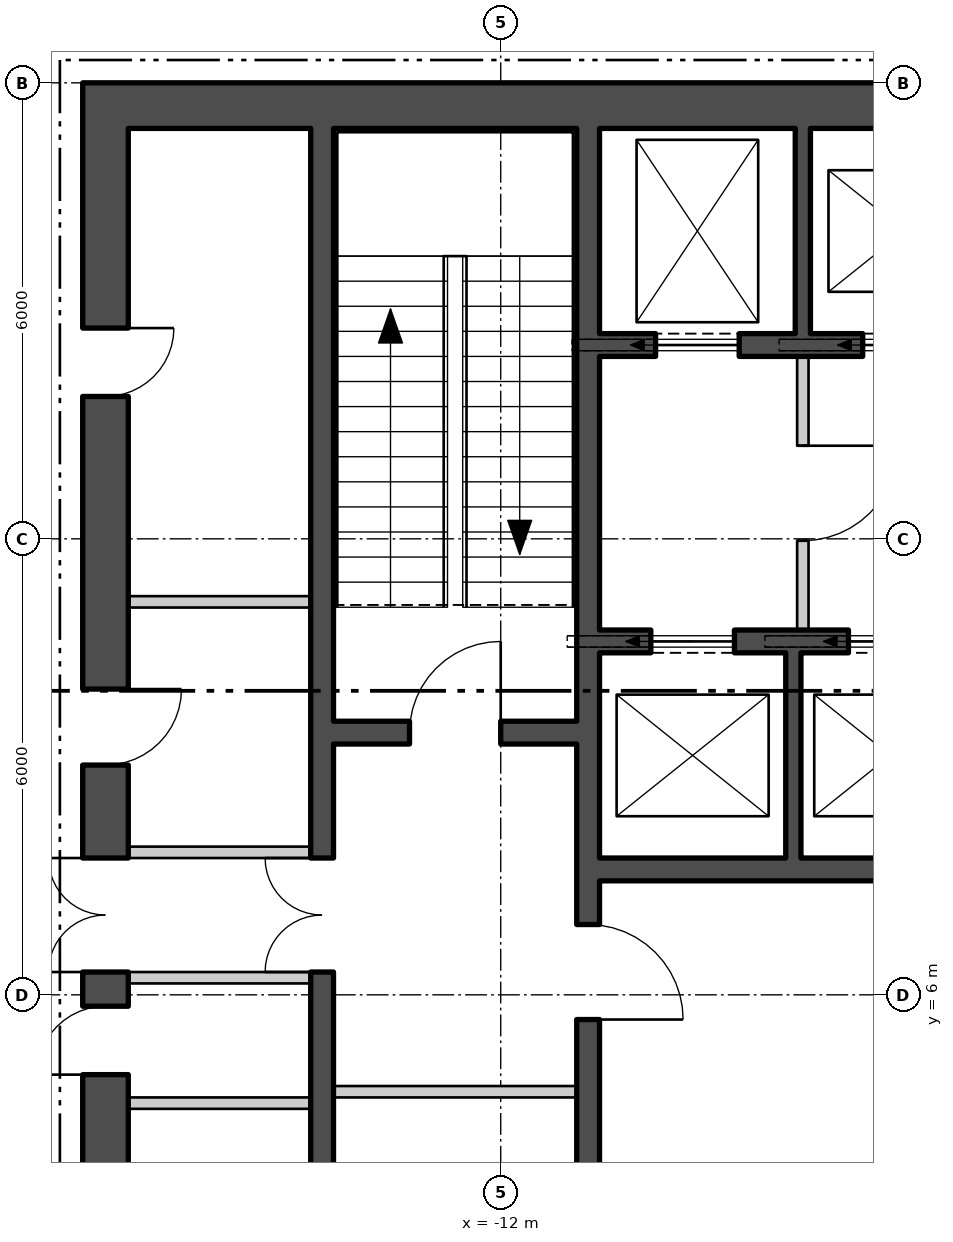
"""IFC4 building model, lengths in metres.
Left out: names, types, materials, properties, quantities, classifications, styles, units other than length and angle.
Written with IfcOpenShell. Run it as: python <this file> out.ifc"""

import sys

from ifc_helpers import new_model, si_unit, direction, frame, frame_2d, origin, place, context, subcontext, project, spatial, polyline, rectangle, outline, extrude, element, fill, save


model = new_model("IFC4")
c1 = context("Model", 3, precision=1e-05, world=origin(), true_north=direction((0.0, 1.0)))
c2 = subcontext(c1, "Body", "Model", "MODEL_VIEW")
j1 = project(units=[si_unit("LENGTHUNIT", "METRE"), si_unit("PLANEANGLEUNIT", "RADIAN")], contexts=[c1])
p1 = place(None, origin())
s1 = spatial("IfcSite", under=j1, at=p1, CompositionType="ELEMENT")
p2 = place(p1, origin())
s2 = spatial("IfcBuilding", under=s1, at=p2, CompositionType="ELEMENT")
p3 = place(p2, frame((0.0, 0.0, 69.3)))
s3 = spatial("IfcBuildingStorey", under=s2, at=p3, CompositionType="ELEMENT", Elevation=69.3)
p4 = place(p3, frame((-28.18, 10.778, -0.18), z_axis=(0.0, 0.0, 1.0), x_axis=(0.500000711659, -0.866024992908, 0.0)))
e1 = element("IfcWall", 1, at=p4, inside=s3, PredefinedType="SOLIDWALL", context=c2, shape_type="SweptSolid", body=[
    extrude(outline(polyline([(-0.13, -0.225), (45.87, -0.225), (45.61, 0.225), (0.13, 0.225), (-0.13, -0.225)])), origin(), (0.0, 0.0, 1.0), 4.28),
])
p5 = place(p4, frame((1.424, 0.0, 1.08)))
e2 = element("IfcOpeningElement", 2, at=p5, cuts=e1, PredefinedType="OPENING", context=c2, shape_type="SweptSolid", body=[
    extrude(rectangle(XDim=2.4, YDim=2.6, at=frame_2d((1.2, 1.3))), frame((0.0, 0.235, 0.0), z_axis=(0.0, -1.0, 0.0), x_axis=(1.0, 0.0, 0.0)), (0.0, 0.0, 1.0), 0.47),
])
p6 = place(p4, frame((5.893, 0.0, 1.08)))
e3 = element("IfcOpeningElement", 3, at=p6, cuts=e1, PredefinedType="OPENING", context=c2, shape_type="SweptSolid", body=[
    extrude(rectangle(XDim=2.4, YDim=2.6, at=frame_2d((1.2, 1.3))), frame((0.0, 0.235, 0.0), z_axis=(0.0, -1.0, 0.0), x_axis=(1.0, 0.0, 0.0)), (0.0, 0.0, 1.0), 0.47),
])
p7 = place(p4, frame((10.401, 0.0, 1.08)))
e4 = element("IfcOpeningElement", 4, at=p7, cuts=e1, PredefinedType="OPENING", context=c2, shape_type="SweptSolid", body=[
    extrude(rectangle(XDim=2.4, YDim=2.6, at=frame_2d((1.2, 1.3))), frame((0.0, 0.235, 0.0), z_axis=(0.0, -1.0, 0.0), x_axis=(1.0, 0.0, 0.0)), (0.0, 0.0, 1.0), 0.47),
])
p8 = place(p4, frame((14.909, 0.0, 1.08)))
e5 = element("IfcOpeningElement", 5, at=p8, cuts=e1, PredefinedType="OPENING", context=c2, shape_type="SweptSolid", body=[
    extrude(rectangle(XDim=2.4, YDim=2.6, at=frame_2d((1.2, 1.3))), frame((0.0, 0.235, 0.0), z_axis=(0.0, -1.0, 0.0), x_axis=(1.0, 0.0, 0.0)), (0.0, 0.0, 1.0), 0.47),
])
p9 = place(p4, frame((19.416, 0.0, 1.08)))
e6 = element("IfcOpeningElement", 6, at=p9, cuts=e1, PredefinedType="OPENING", context=c2, shape_type="SweptSolid", body=[
    extrude(rectangle(XDim=2.4, YDim=2.6, at=frame_2d((1.2, 1.3))), frame((0.0, 0.235, 0.0), z_axis=(0.0, -1.0, 0.0), x_axis=(1.0, 0.0, 0.0)), (0.0, 0.0, 1.0), 0.47),
])
p10 = place(p4, frame((23.924, 0.0, 1.08)))
e7 = element("IfcOpeningElement", 7, at=p10, cuts=e1, PredefinedType="OPENING", context=c2, shape_type="SweptSolid", body=[
    extrude(rectangle(XDim=2.4, YDim=2.6, at=frame_2d((1.2, 1.3))), frame((0.0, 0.235, 0.0), z_axis=(0.0, -1.0, 0.0), x_axis=(1.0, 0.0, 0.0)), (0.0, 0.0, 1.0), 0.47),
])
p11 = place(p4, frame((28.431, 0.0, 1.08)))
e8 = element("IfcOpeningElement", 8, at=p11, cuts=e1, PredefinedType="OPENING", context=c2, shape_type="SweptSolid", body=[
    extrude(rectangle(XDim=2.4, YDim=2.6, at=frame_2d((1.2, 1.3))), frame((0.0, 0.235, 0.0), z_axis=(0.0, -1.0, 0.0), x_axis=(1.0, 0.0, 0.0)), (0.0, 0.0, 1.0), 0.47),
])
p12 = place(p4, frame((32.939, 0.0, 1.08)))
e9 = element("IfcOpeningElement", 9, at=p12, cuts=e1, PredefinedType="OPENING", context=c2, shape_type="SweptSolid", body=[
    extrude(rectangle(XDim=2.4, YDim=2.6, at=frame_2d((1.2, 1.3))), frame((0.0, 0.235, 0.0), z_axis=(0.0, -1.0, 0.0), x_axis=(1.0, 0.0, 0.0)), (0.0, 0.0, 1.0), 0.47),
])
p13 = place(p4, frame((37.447, 0.0, 1.08)))
e10 = element("IfcOpeningElement", 10, at=p13, cuts=e1, PredefinedType="OPENING", context=c2, shape_type="SweptSolid", body=[
    extrude(rectangle(XDim=2.4, YDim=2.6, at=frame_2d((1.2, 1.3))), frame((0.0, 0.235, 0.0), z_axis=(0.0, -1.0, 0.0), x_axis=(1.0, 0.0, 0.0)), (0.0, 0.0, 1.0), 0.47),
])
p14 = place(p4, frame((41.916, 0.0, 1.08)))
e11 = element("IfcOpeningElement", 11, at=p14, cuts=e1, PredefinedType="OPENING", context=c2, shape_type="SweptSolid", body=[
    extrude(rectangle(XDim=2.4, YDim=2.6, at=frame_2d((1.2, 1.3))), frame((0.0, 0.235, 0.0), z_axis=(0.0, -1.0, 0.0), x_axis=(1.0, 0.0, 0.0)), (0.0, 0.0, 1.0), 0.47),
])
p15 = place(p3, frame((-17.5, 17.7, 0.0), z_axis=(0.0, 0.0, 1.0), x_axis=(1.0, 0.0, 0.0)))
e12 = element("IfcWall", 12, at=p15, inside=s3, PredefinedType="SHEAR", context=c2, shape_type="SweptSolid", body=[
    extrude(rectangle(XDim=35.0, YDim=0.6, at=frame_2d((17.5, 0.0))), origin(), (0.0, 0.0, 1.0), 4.3),
])
p16 = place(p3, frame((-17.2, 0.6, 0.0), z_axis=(0.0, 0.0, 1.0), x_axis=(0.0, 1.0, 0.0)))
e13 = element("IfcWall", 13, at=p16, inside=s3, PredefinedType="SHEAR", context=c2, shape_type="SweptSolid", body=[
    extrude(rectangle(XDim=16.8, YDim=0.6, at=frame_2d((8.4, 0.0))), origin(), (0.0, 0.0, 1.0), 4.3),
])
p17 = place(p16, frame((5.7, 0.0, 0.0)))
e14 = element("IfcOpeningElement", 14, at=p17, cuts=e13, PredefinedType="OPENING", context=c2, shape_type="SweptSolid", body=[
    extrude(rectangle(XDim=1.5, YDim=2.1, at=frame_2d((0.75, 1.05))), frame((0.0, 0.31, 0.0), z_axis=(0.0, -1.0, 0.0), x_axis=(1.0, 0.0, 0.0)), (0.0, 0.0, 1.0), 0.62),
])
p18 = place(p16, frame((1.5, 0.0, 0.0)))
e15 = element("IfcOpeningElement", 15, at=p18, cuts=e13, PredefinedType="OPENING", context=c2, shape_type="SweptSolid", body=[
    extrude(rectangle(XDim=0.9, YDim=2.1, at=frame_2d((0.45, 1.05))), frame((0.0, 0.31, 0.0), z_axis=(0.0, -1.0, 0.0), x_axis=(1.0, 0.0, 0.0)), (0.0, 0.0, 1.0), 0.62),
])
p19 = place(p16, frame((4.35, 0.0, 0.0)))
e16 = element("IfcOpeningElement", 16, at=p19, cuts=e13, PredefinedType="OPENING", context=c2, shape_type="SweptSolid", body=[
    extrude(rectangle(XDim=0.9, YDim=2.1, at=frame_2d((0.45, 1.05))), frame((0.0, 0.31, 0.0), z_axis=(0.0, -1.0, 0.0), x_axis=(1.0, 0.0, 0.0)), (0.0, 0.0, 1.0), 0.62),
])
p20 = place(p16, frame((8.423, 0.0, 0.0)))
e17 = element("IfcOpeningElement", 17, at=p20, cuts=e13, PredefinedType="OPENING", context=c2, shape_type="SweptSolid", body=[
    extrude(rectangle(XDim=1.0, YDim=2.1, at=frame_2d((0.5, 1.05))), frame((0.0, 0.31, 0.0), z_axis=(0.0, -1.0, 0.0), x_axis=(1.0, 0.0, 0.0)), (0.0, 0.0, 1.0), 0.62),
])
p21 = place(p16, frame((13.273, 0.0, 0.0)))
e18 = element("IfcOpeningElement", 18, at=p21, cuts=e13, PredefinedType="OPENING", context=c2, shape_type="SweptSolid", body=[
    extrude(rectangle(XDim=0.9, YDim=2.1, at=frame_2d((0.45, 1.05))), frame((0.0, 0.31, 0.0), z_axis=(0.0, -1.0, 0.0), x_axis=(1.0, 0.0, 0.0)), (0.0, 0.0, 1.0), 0.62),
])
p22 = place(p3, frame((-10.85, 0.6, 0.0), z_axis=(0.0, 0.0, 1.0), x_axis=(0.0, 1.0, 0.0)))
e19 = element("IfcWall", 19, at=p22, inside=s3, PredefinedType="SHEAR", context=c2, shape_type="SweptSolid", body=[
    extrude(rectangle(XDim=16.8, YDim=0.3, at=frame_2d((8.4, 0.0))), origin(), (0.0, 0.0, 1.0), 4.3),
])
p23 = place(p22, frame((5.075, 0.0, 0.0)))
e20 = element("IfcOpeningElement", 20, at=p23, cuts=e19, PredefinedType="OPENING", context=c2, shape_type="SweptSolid", body=[
    extrude(rectangle(XDim=1.25, YDim=2.1, at=frame_2d((0.625, 1.05))), frame((0.0, 0.16, 0.0), z_axis=(0.0, -1.0, 0.0), x_axis=(1.0, 0.0, 0.0)), (0.0, 0.0, 1.0), 0.32),
])
p24 = place(p22, frame((1.525, 0.0, 0.0)))
e21 = element("IfcOpeningElement", 21, at=p24, cuts=e19, PredefinedType="OPENING", context=c2, shape_type="SweptSolid", body=[
    extrude(rectangle(XDim=1.0, YDim=2.1, at=frame_2d((0.5, 1.05))), frame((0.0, 0.16, 0.0), z_axis=(0.0, -1.0, 0.0), x_axis=(1.0, 0.0, 0.0)), (0.0, 0.0, 1.0), 0.32),
])
p25 = place(p3, frame((-14.35, 0.6, 0.0), z_axis=(0.0, 0.0, 1.0), x_axis=(0.0, 1.0, 0.0)))
e22 = element("IfcWall", 22, at=p25, inside=s3, PredefinedType="SHEAR", context=c2, shape_type="SweptSolid", body=[
    extrude(rectangle(XDim=16.8, YDim=0.3, at=frame_2d((8.4, 0.0))), origin(), (0.0, 0.0, 1.0), 4.3),
])
p26 = place(p25, frame((5.7, 0.0, 0.0)))
e23 = element("IfcOpeningElement", 23, at=p26, cuts=e22, PredefinedType="OPENING", context=c2, shape_type="SweptSolid", body=[
    extrude(rectangle(XDim=1.5, YDim=2.1, at=frame_2d((0.75, 1.05))), frame((0.0, 0.16, 0.0), z_axis=(0.0, -1.0, 0.0), x_axis=(1.0, 0.0, 0.0)), (0.0, 0.0, 1.0), 0.32),
])
p27 = place(p3, frame((-14.2, 9.45, 0.0), z_axis=(0.0, 0.0, 1.0), x_axis=(1.0, 0.0, 0.0)))
e24 = element("IfcWall", 24, at=p27, inside=s3, PredefinedType="SHEAR", context=c2, shape_type="SweptSolid", body=[
    extrude(rectangle(XDim=3.2, YDim=0.3, at=frame_2d((1.6, 0.0))), origin(), (0.0, 0.0, 1.0), 4.3),
])
p28 = place(p27, frame((1.0, 0.0, 0.0)))
e25 = element("IfcOpeningElement", 25, at=p28, cuts=e24, PredefinedType="OPENING", context=c2, shape_type="SweptSolid", body=[
    extrude(rectangle(XDim=1.2, YDim=2.1, at=frame_2d((0.6, 1.05))), frame((0.0, 0.16, 0.0), z_axis=(0.0, -1.0, 0.0), x_axis=(1.0, 0.0, 0.0)), (0.0, 0.0, 1.0), 0.32),
])
p29 = place(p3, frame((-10.7, 14.55, 0.0), z_axis=(0.0, 0.0, 1.0), x_axis=(1.0, 0.0, 0.0)))
e26 = element("IfcWall", 26, at=p29, inside=s3, PredefinedType="SHEAR", context=c2, shape_type="SweptSolid", body=[
    extrude(rectangle(XDim=21.4, YDim=0.3, at=frame_2d((10.7, 0.0))), origin(), (0.0, 0.0, 1.0), 4.3),
])
p30 = place(p29, frame((0.738, 0.0, 0.0)))
e27 = element("IfcOpeningElement", 27, at=p30, cuts=e26, PredefinedType="OPENING", context=c2, shape_type="SweptSolid", body=[
    extrude(rectangle(XDim=1.1, YDim=2.1, at=frame_2d((0.55, 1.05))), frame((0.0, 0.16, 0.0), z_axis=(0.0, -1.0, 0.0), x_axis=(1.0, 0.0, 0.0)), (0.0, 0.0, 1.0), 0.32),
])
p31 = place(p29, frame((3.462, 0.0, 0.0)))
e28 = element("IfcOpeningElement", 28, at=p31, cuts=e26, PredefinedType="OPENING", context=c2, shape_type="SweptSolid", body=[
    extrude(rectangle(XDim=1.1, YDim=2.1, at=frame_2d((0.55, 1.05))), frame((0.0, 0.16, 0.0), z_axis=(0.0, -1.0, 0.0), x_axis=(1.0, 0.0, 0.0)), (0.0, 0.0, 1.0), 0.32),
])
p32 = place(p29, frame((6.138, 0.0, 0.0)))
e29 = element("IfcOpeningElement", 29, at=p32, cuts=e26, PredefinedType="OPENING", context=c2, shape_type="SweptSolid", body=[
    extrude(rectangle(XDim=1.1, YDim=2.1, at=frame_2d((0.55, 1.05))), frame((0.0, 0.16, 0.0), z_axis=(0.0, -1.0, 0.0), x_axis=(1.0, 0.0, 0.0)), (0.0, 0.0, 1.0), 0.32),
])
p33 = place(p29, frame((8.812, 0.0, 0.0)))
e30 = element("IfcOpeningElement", 30, at=p33, cuts=e26, PredefinedType="OPENING", context=c2, shape_type="SweptSolid", body=[
    extrude(rectangle(XDim=1.1, YDim=2.1, at=frame_2d((0.55, 1.05))), frame((0.0, 0.16, 0.0), z_axis=(0.0, -1.0, 0.0), x_axis=(1.0, 0.0, 0.0)), (0.0, 0.0, 1.0), 0.32),
])
p34 = place(p29, frame((14.162, 0.0, 0.0)))
e31 = element("IfcOpeningElement", 31, at=p34, cuts=e26, PredefinedType="OPENING", context=c2, shape_type="SweptSolid", body=[
    extrude(rectangle(XDim=1.1, YDim=2.1, at=frame_2d((0.55, 1.05))), frame((0.0, 0.16, 0.0), z_axis=(0.0, -1.0, 0.0), x_axis=(1.0, 0.0, 0.0)), (0.0, 0.0, 1.0), 0.32),
])
p35 = place(p29, frame((16.837, 0.0, 0.0)))
e32 = element("IfcOpeningElement", 32, at=p35, cuts=e26, PredefinedType="OPENING", context=c2, shape_type="SweptSolid", body=[
    extrude(rectangle(XDim=1.1, YDim=2.1, at=frame_2d((0.55, 1.05))), frame((0.0, 0.16, 0.0), z_axis=(0.0, -1.0, 0.0), x_axis=(1.0, 0.0, 0.0)), (0.0, 0.0, 1.0), 0.32),
])
p36 = place(p29, frame((19.562, 0.0, 0.0)))
e33 = element("IfcOpeningElement", 33, at=p36, cuts=e26, PredefinedType="OPENING", context=c2, shape_type="SweptSolid", body=[
    extrude(rectangle(XDim=1.1, YDim=2.1, at=frame_2d((0.55, 1.05))), frame((0.0, 0.16, 0.0), z_axis=(0.0, -1.0, 0.0), x_axis=(1.0, 0.0, 0.0)), (0.0, 0.0, 1.0), 0.32),
])
p37 = place(p3, frame((-10.7, 10.65, 0.0), z_axis=(0.0, 0.0, 1.0), x_axis=(1.0, 0.0, 0.0)))
e34 = element("IfcWall", 34, at=p37, inside=s3, PredefinedType="SHEAR", context=c2, shape_type="SweptSolid", body=[
    extrude(rectangle(XDim=10.3, YDim=0.3, at=frame_2d((5.15, 0.0))), origin(), (0.0, 0.0, 1.0), 4.3),
])
p38 = place(p37, frame((0.675, 0.0, 0.0)))
e35 = element("IfcOpeningElement", 35, at=p38, cuts=e34, PredefinedType="OPENING", context=c2, shape_type="SweptSolid", body=[
    extrude(rectangle(XDim=1.1, YDim=2.1, at=frame_2d((0.55, 1.05))), frame((0.0, 0.16, 0.0), z_axis=(0.0, -1.0, 0.0), x_axis=(1.0, 0.0, 0.0)), (0.0, 0.0, 1.0), 0.32),
])
p39 = place(p37, frame((3.275, 0.0, 0.0)))
e36 = element("IfcOpeningElement", 36, at=p39, cuts=e34, PredefinedType="OPENING", context=c2, shape_type="SweptSolid", body=[
    extrude(rectangle(XDim=1.1, YDim=2.1, at=frame_2d((0.55, 1.05))), frame((0.0, 0.16, 0.0), z_axis=(0.0, -1.0, 0.0), x_axis=(1.0, 0.0, 0.0)), (0.0, 0.0, 1.0), 0.32),
])
p40 = place(p37, frame((5.825, 0.0, 0.0)))
e37 = element("IfcOpeningElement", 37, at=p40, cuts=e34, PredefinedType="OPENING", context=c2, shape_type="SweptSolid", body=[
    extrude(rectangle(XDim=1.1, YDim=2.1, at=frame_2d((0.55, 1.05))), frame((0.0, 0.16, 0.0), z_axis=(0.0, -1.0, 0.0), x_axis=(1.0, 0.0, 0.0)), (0.0, 0.0, 1.0), 0.32),
])
p41 = place(p37, frame((8.375, 0.0, 0.0)))
e38 = element("IfcOpeningElement", 38, at=p41, cuts=e34, PredefinedType="OPENING", context=c2, shape_type="SweptSolid", body=[
    extrude(rectangle(XDim=1.1, YDim=2.1, at=frame_2d((0.55, 1.05))), frame((0.0, 0.16, 0.0), z_axis=(0.0, -1.0, 0.0), x_axis=(1.0, 0.0, 0.0)), (0.0, 0.0, 1.0), 0.32),
])
p42 = place(p3, frame((-10.7, 7.65, 0.0), z_axis=(0.0, 0.0, 1.0), x_axis=(1.0, 0.0, 0.0)))
e39 = element("IfcWall", 39, at=p42, inside=s3, PredefinedType="SHEAR", context=c2, shape_type="SweptSolid", body=[
    extrude(rectangle(XDim=10.3, YDim=0.3, at=frame_2d((5.15, 0.0))), origin(), (0.0, 0.0, 1.0), 4.3),
])
for number, where, z_axis, x_axis in (
    (40, (-8.025, 14.7, 0.0), (0.0, 0.0, 1.0), (0.0, 1.0, 0.0)),
    (41, (-8.15, 7.8, 0.0), (0.0, 0.0, 1.0), (0.0, 1.0, 0.0)),
):
    element("IfcWall", number, at=place(p3, frame(where, z_axis=z_axis, x_axis=x_axis)), inside=s3, PredefinedType="SHEAR", context=c2, shape_type="SweptSolid", body=[
        extrude(rectangle(XDim=2.7, YDim=0.2, at=frame_2d((1.35, 0.0))), origin(), (0.0, 0.0, 1.0), 4.3),
    ])
p43 = place(p3, frame((-8.025, 10.8, 0.0), z_axis=(0.0, 0.0, 1.0), x_axis=(0.0, 1.0, 0.0)))
e42 = element("IfcWall", 42, at=p43, inside=s3, PredefinedType="PARTITIONING", context=c2, shape_type="SweptSolid", body=[
    extrude(rectangle(XDim=3.6, YDim=0.15, at=frame_2d((1.8, 0.0))), origin(), (0.0, 0.0, 1.0), 4.3),
])
p44 = place(p43, frame((1.175, 0.0, 0.0)))
e43 = element("IfcOpeningElement", 43, at=p44, cuts=e42, PredefinedType="OPENING", context=c2, shape_type="SweptSolid", body=[
    extrude(rectangle(XDim=1.25, YDim=2.1, at=frame_2d((0.625, 1.05))), frame((0.0, 0.085, 0.0), z_axis=(0.0, -1.0, 0.0), x_axis=(1.0, 0.0, 0.0)), (0.0, 0.0, 1.0), 0.17),
])
p45 = place(p3, frame((-14.2, 4.725, 0.0), z_axis=(0.0, 0.0, 1.0), x_axis=(1.0, 0.0, 0.0)))
e44 = element("IfcWall", 44, at=p45, inside=s3, PredefinedType="PARTITIONING", context=c2, shape_type="SweptSolid", body=[
    extrude(rectangle(XDim=3.2, YDim=0.15, at=frame_2d((1.6, 0.0))), origin(), (0.0, 0.0, 1.0), 4.3),
])
for number, where, z_axis, x_axis in (
    (45, (-16.9, 6.225, 0.0), (0.0, 0.0, 1.0), (1.0, 0.0, 0.0)),
    (46, (-16.9, 7.875, 0.0), (0.0, 0.0, 1.0), (1.0, 0.0, 0.0)),
    (47, (-16.9, 4.575, 0.0), (0.0, 0.0, 1.0), (1.0, 0.0, 0.0)),
    (48, (-16.9, 11.171, 0.0), (0.0, 0.0, 1.0), (1.0, 0.0, 0.0)),
):
    element("IfcWall", number, at=place(p3, frame(where, z_axis=z_axis, x_axis=x_axis)), inside=s3, PredefinedType="PARTITIONING", context=c2, shape_type="SweptSolid", body=[
        extrude(rectangle(XDim=2.4, YDim=0.15, at=frame_2d((1.2, 0.0))), origin(), (0.0, 0.0, 1.0), 4.3),
    ])
p46 = place(p30, origin())
e49 = element("IfcDoor", 49, at=p46, inside=s3, OperationType="SLIDING_TO_LEFT", PredefinedType="DOOR", context=c2, shape_type="SweptSolid", body=[
    extrude(rectangle(XDim=1.1, YDim=2.1, at=frame_2d((0.55, 1.05))), frame((0.0, 0.025, 0.0), z_axis=(0.0, -1.0, 0.0), x_axis=(1.0, 0.0, 0.0)), (0.0, 0.0, 1.0), 0.05),
])
fill(e27, e49)
p47 = place(p31, origin())
e50 = element("IfcDoor", 50, at=p47, inside=s3, OperationType="SLIDING_TO_LEFT", PredefinedType="DOOR", context=c2, shape_type="SweptSolid", body=[
    extrude(rectangle(XDim=1.1, YDim=2.1, at=frame_2d((0.55, 1.05))), frame((0.0, 0.025, 0.0), z_axis=(0.0, -1.0, 0.0), x_axis=(1.0, 0.0, 0.0)), (0.0, 0.0, 1.0), 0.05),
])
fill(e28, e50)
p48 = place(p38, origin())
e51 = element("IfcDoor", 51, at=p48, inside=s3, OperationType="SLIDING_TO_LEFT", PredefinedType="DOOR", context=c2, shape_type="SweptSolid", body=[
    extrude(rectangle(XDim=1.1, YDim=2.1, at=frame_2d((0.55, 1.05))), frame((0.0, 0.025, 0.0), z_axis=(0.0, -1.0, 0.0), x_axis=(1.0, 0.0, 0.0)), (0.0, 0.0, 1.0), 0.05),
])
fill(e35, e51)
p49 = place(p39, origin())
e52 = element("IfcDoor", 52, at=p49, inside=s3, OperationType="SLIDING_TO_LEFT", PredefinedType="DOOR", context=c2, shape_type="SweptSolid", body=[
    extrude(rectangle(XDim=1.1, YDim=2.1, at=frame_2d((0.55, 1.05))), frame((0.0, 0.025, 0.0), z_axis=(0.0, -1.0, 0.0), x_axis=(1.0, 0.0, 0.0)), (0.0, 0.0, 1.0), 0.05),
])
fill(e36, e52)
p50 = place(p44, origin())
e53 = element("IfcDoor", 53, at=p50, inside=s3, OperationType="SINGLE_SWING_RIGHT", PredefinedType="DOOR", context=c2, shape_type="SweptSolid", body=[
    extrude(rectangle(XDim=1.25, YDim=2.1, at=frame_2d((0.625, 1.05))), frame((0.0, 0.025, 0.0), z_axis=(0.0, -1.0, 0.0), x_axis=(1.0, 0.0, 0.0)), (0.0, 0.0, 1.0), 0.05),
])
fill(e43, e53)
p51 = place(p28, origin())
e54 = element("IfcDoor", 54, at=p51, inside=s3, OperationType="SINGLE_SWING_LEFT", PredefinedType="DOOR", context=c2, shape_type="SweptSolid", body=[
    extrude(rectangle(XDim=1.2, YDim=2.1, at=frame_2d((0.6, 1.05))), frame((0.0, 0.025, 0.0), z_axis=(0.0, -1.0, 0.0), x_axis=(1.0, 0.0, 0.0)), (0.0, 0.0, 1.0), 0.05),
])
fill(e25, e54)
p52 = place(p23, origin())
e55 = element("IfcDoor", 55, at=p52, inside=s3, OperationType="SINGLE_SWING_LEFT", PredefinedType="DOOR", context=c2, shape_type="SweptSolid", body=[
    extrude(rectangle(XDim=1.25, YDim=2.1, at=frame_2d((0.625, 1.05))), frame((0.0, 0.025, 0.0), z_axis=(0.0, -1.0, 0.0), x_axis=(1.0, 0.0, 0.0)), (0.0, 0.0, 1.0), 0.05),
])
fill(e20, e55)
p53 = place(p26, origin())
e56 = element("IfcDoor", 56, at=p53, inside=s3, OperationType="DOUBLE_DOOR_SINGLE_SWING", PredefinedType="DOOR", context=c2, shape_type="SweptSolid", body=[
    extrude(rectangle(XDim=1.5, YDim=2.1, at=frame_2d((0.75, 1.05))), frame((0.0, 0.025, 0.0), z_axis=(0.0, -1.0, 0.0), x_axis=(1.0, 0.0, 0.0)), (0.0, 0.0, 1.0), 0.05),
])
fill(e23, e56)
p54 = place(p17, origin())
e57 = element("IfcDoor", 57, at=p54, inside=s3, OperationType="DOUBLE_DOOR_SINGLE_SWING", PredefinedType="DOOR", context=c2, shape_type="SweptSolid", body=[
    extrude(rectangle(XDim=1.5, YDim=2.1, at=frame_2d((0.75, 1.05))), frame((0.0, 0.025, 0.0), z_axis=(0.0, -1.0, 0.0), x_axis=(1.0, 0.0, 0.0)), (0.0, 0.0, 1.0), 0.05),
])
fill(e14, e57)
p55 = place(p19, origin())
e58 = element("IfcDoor", 58, at=p55, inside=s3, OperationType="SINGLE_SWING_RIGHT", PredefinedType="DOOR", context=c2, shape_type="SweptSolid", body=[
    extrude(rectangle(XDim=0.9, YDim=2.1, at=frame_2d((0.45, 1.05))), frame((0.0, 0.025, 0.0), z_axis=(0.0, -1.0, 0.0), x_axis=(1.0, 0.0, 0.0)), (0.0, 0.0, 1.0), 0.05),
])
fill(e16, e58)
p56 = place(p20, origin())
e59 = element("IfcDoor", 59, at=p56, inside=s3, OperationType="SINGLE_SWING_RIGHT", PredefinedType="DOOR", context=c2, shape_type="SweptSolid", body=[
    extrude(rectangle(XDim=1.0, YDim=2.1, at=frame_2d((0.5, 1.05))), frame((0.0, 0.025, 0.0), z_axis=(0.0, -1.0, 0.0), x_axis=(1.0, 0.0, 0.0)), (0.0, 0.0, 1.0), 0.05),
])
fill(e17, e59)
p57 = place(p21, origin())
e60 = element("IfcDoor", 60, at=p57, inside=s3, OperationType="SINGLE_SWING_RIGHT", PredefinedType="DOOR", context=c2, shape_type="SweptSolid", body=[
    extrude(rectangle(XDim=0.9, YDim=2.1, at=frame_2d((0.45, 1.05))), frame((0.0, 0.025, 0.0), z_axis=(0.0, -1.0, 0.0), x_axis=(1.0, 0.0, 0.0)), (0.0, 0.0, 1.0), 0.05),
])
fill(e18, e60)
save(model, sys.argv[1])
